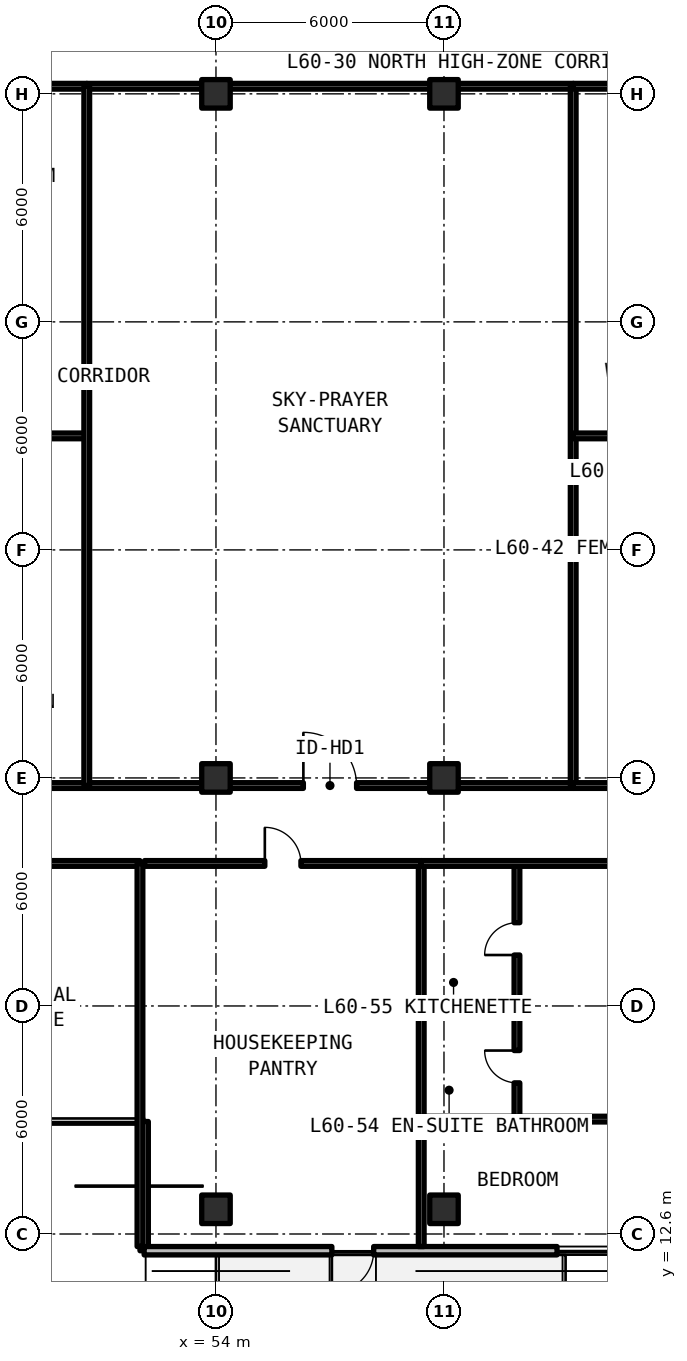
"""IFC4 building model, lengths in metres.
Left out: names, types, materials, properties, quantities, classifications, styles, units other than length and angle.
Written with IfcOpenShell. Run it as: python <this file> out.ifc"""

import sys

from ifc_helpers import new_model, si_unit, direction, frame, frame_2d, origin, origin_2d, place, context, subcontext, project, spatial, rectangle, extrude, element, fill, save


model = new_model("IFC4")
c1 = context("Model", 3, precision=1e-05, world=origin(), true_north=direction((0.0, 1.0)))
c2 = subcontext(c1, "Body", "Model", "MODEL_VIEW")
j1 = project(units=[si_unit("LENGTHUNIT", "METRE"), si_unit("PLANEANGLEUNIT", "RADIAN")], contexts=[c1])
p1 = place(None, origin())
s1 = spatial("IfcSite", under=j1, at=p1, CompositionType="ELEMENT")
p2 = place(p1, origin())
s2 = spatial("IfcBuilding", under=s1, at=p2, CompositionType="ELEMENT")
p3 = place(p2, frame((0.0, 0.0, 215.49)))
s3 = spatial("IfcBuildingStorey", under=s2, at=p3, CompositionType="ELEMENT", Elevation=215.49)
for number, where, z_axis, x_axis in (
    (1, (54.0, 24.6, 0.0), (0.0, 0.0, 1.0), (1.0, 0.0, 0.0)),
    (2, (54.0, 42.6, 0.0), (0.0, 0.0, 1.0), (1.0, 0.0, 0.0)),
    (3, (60.0, 24.6, 0.0), (0.0, 0.0, 1.0), (1.0, 0.0, 0.0)),
    (4, (60.0, 42.6, 0.0), (0.0, 0.0, 1.0), (1.0, 0.0, 0.0)),
    (5, (54.0, 13.25, 0.0), (0.0, 0.0, 1.0), (1.0, 0.0, 0.0)),
    (6, (60.0, 13.25, 0.0), (0.0, 0.0, 1.0), (1.0, 0.0, 0.0)),
):
    element("IfcColumn", number, at=place(p3, frame(where, z_axis=z_axis, x_axis=x_axis)), inside=s3, PredefinedType="COLUMN", context=c2, shape_type="SweptSolid", body=[
        extrude(rectangle(XDim=0.75, YDim=0.75, at=origin_2d()), origin(), (0.0, 0.0, 1.0), 3.63),
    ])
p4 = place(p3, frame((52.11, 15.56, 0.0), z_axis=(0.0, 0.0, 1.0), x_axis=(0.0, -1.0, 0.0)))
e7 = element("IfcWall", 7, at=p4, inside=s3, PredefinedType="SOLIDWALL", context=c2, shape_type="SweptSolid", body=[
    extrude(rectangle(XDim=3.4, YDim=0.22, at=frame_2d((1.7, 0.0))), origin(), (0.0, 0.0, 1.0), 3.41),
])
p5 = place(p3, frame((52.11, 12.16, 0.0), z_axis=(0.0, 0.0, 1.0), x_axis=(1.0, 0.0, 0.0)))
e8 = element("IfcWall", 8, at=p5, inside=s3, PredefinedType="SOLIDWALL", context=c2, shape_type="SweptSolid", body=[
    extrude(rectangle(XDim=43.244, YDim=0.22, at=frame_2d((21.622, 0.0))), origin(), (0.0, 0.0, 1.0), 3.41),
])
p6 = place(p5, frame((4.94, 0.0, 0.0)))
e9 = element("IfcOpeningElement", 9, at=p6, cuts=e8, PredefinedType="OPENING", context=c2, shape_type="SweptSolid", body=[
    extrude(rectangle(XDim=1.1, YDim=2.15, at=frame_2d((0.55, 1.075))), frame((0.0, 0.12, 0.0), z_axis=(0.0, -1.0, 0.0), x_axis=(1.0, 0.0, 0.0)), (0.0, 0.0, 1.0), 0.24),
])
p7 = place(p5, frame((17.04, 0.0, 0.0)))
e10 = element("IfcOpeningElement", 10, at=p7, cuts=e8, PredefinedType="OPENING", context=c2, shape_type="SweptSolid", body=[
    extrude(rectangle(XDim=1.1, YDim=2.15, at=frame_2d((0.55, 1.075))), frame((0.0, 0.12, 0.0), z_axis=(0.0, -1.0, 0.0), x_axis=(1.0, 0.0, 0.0)), (0.0, 0.0, 1.0), 0.24),
])
p8 = place(p5, frame((28.89, 0.0, 0.0)))
e11 = element("IfcOpeningElement", 11, at=p8, cuts=e8, PredefinedType="OPENING", context=c2, shape_type="SweptSolid", body=[
    extrude(rectangle(XDim=1.1, YDim=2.15, at=frame_2d((0.55, 1.075))), frame((0.0, 0.12, 0.0), z_axis=(0.0, -1.0, 0.0), x_axis=(1.0, 0.0, 0.0)), (0.0, 0.0, 1.0), 0.24),
])
p9 = place(p5, frame((10.865, 0.0, 0.78)))
e12 = element("IfcOpeningElement", 12, at=p9, cuts=e8, PredefinedType="OPENING", context=c2, shape_type="SweptSolid", body=[
    extrude(rectangle(XDim=1.65, YDim=1.66, at=frame_2d((0.825, 0.83))), frame((0.0, 0.12, 0.0), z_axis=(0.0, -1.0, 0.0), x_axis=(1.0, 0.0, 0.0)), (0.0, 0.0, 1.0), 0.24),
])
p10 = place(p5, frame((38.666, 0.0, 0.78)))
e13 = element("IfcOpeningElement", 13, at=p10, cuts=e8, PredefinedType="OPENING", context=c2, shape_type="SweptSolid", body=[
    extrude(rectangle(XDim=1.65, YDim=1.66, at=frame_2d((0.825, 0.83))), frame((0.0, 0.12, 0.0), z_axis=(0.0, -1.0, 0.0), x_axis=(1.0, 0.0, 0.0)), (0.0, 0.0, 1.0), 0.24),
])
for number, where, z_axis, x_axis in (
    (14, (46.55, 24.4, 0.0), (0.0, 0.0, 1.0), (1.0, 0.0, 0.0)),
    (15, (46.55, 33.6, 0.0), (0.0, 0.0, 1.0), (1.0, 0.0, 0.0)),
    (16, (46.55, 42.8, 0.0), (0.0, 0.0, 1.0), (1.0, 0.0, 0.0)),
):
    element("IfcWall", number, at=place(p3, frame(where, z_axis=z_axis, x_axis=x_axis)), inside=s3, PredefinedType="SOLIDWALL", context=c2, shape_type="SweptSolid", body=[
        extrude(rectangle(XDim=4.05, YDim=0.15, at=frame_2d((2.025, 0.0))), origin(), (0.0, 0.0, 1.0), 2.63),
    ])
p11 = place(p3, frame((50.6, 24.4, 0.0), z_axis=(0.0, 0.0, 1.0), x_axis=(1.0, 0.0, 0.0)))
e17 = element("IfcWall", 17, at=p11, inside=s3, PredefinedType="SOLIDWALL", context=c2, shape_type="SweptSolid", body=[
    extrude(rectangle(XDim=12.8, YDim=0.15, at=frame_2d((6.4, 0.0))), origin(), (0.0, 0.0, 1.0), 2.63),
])
p12 = place(p11, frame((5.7, 0.0, 0.0)))
e18 = element("IfcOpeningElement", 18, at=p12, cuts=e17, PredefinedType="OPENING", context=c2, shape_type="SweptSolid", body=[
    extrude(rectangle(XDim=1.4, YDim=2.15, at=frame_2d((0.7, 1.075))), frame((0.0, 0.085, 0.0), z_axis=(0.0, -1.0, 0.0), x_axis=(1.0, 0.0, 0.0)), (0.0, 0.0, 1.0), 0.17),
])
p13 = place(p3, frame((50.6, 42.8, 0.0), z_axis=(0.0, 0.0, 1.0), x_axis=(1.0, 0.0, 0.0)))
e19 = element("IfcWall", 19, at=p13, inside=s3, PredefinedType="SOLIDWALL", context=c2, shape_type="SweptSolid", body=[
    extrude(rectangle(XDim=12.8, YDim=0.15, at=frame_2d((6.4, 0.0))), origin(), (0.0, 0.0, 1.0), 2.63),
])
for number, where, z_axis, x_axis in (
    (20, (50.6, 24.4, 0.0), (0.0, 0.0, 1.0), (0.0, 1.0, 0.0)),
    (21, (63.4, 24.4, 0.0), (0.0, 0.0, 1.0), (0.0, 1.0, 0.0)),
):
    element("IfcWall", number, at=place(p3, frame(where, z_axis=z_axis, x_axis=x_axis)), inside=s3, PredefinedType="SOLIDWALL", context=c2, shape_type="SweptSolid", body=[
        extrude(rectangle(XDim=18.4, YDim=0.15, at=frame_2d((9.2, 0.0))), origin(), (0.0, 0.0, 1.0), 2.63),
    ])
for number, where, z_axis, x_axis in (
    (22, (63.4, 24.4, 0.0), (0.0, 0.0, 1.0), (1.0, 0.0, 0.0)),
    (23, (63.4, 33.6, 0.0), (0.0, 0.0, 1.0), (1.0, 0.0, 0.0)),
    (24, (63.4, 42.8, 0.0), (0.0, 0.0, 1.0), (1.0, 0.0, 0.0)),
):
    element("IfcWall", number, at=place(p3, frame(where, z_axis=z_axis, x_axis=x_axis)), inside=s3, PredefinedType="SOLIDWALL", context=c2, shape_type="SweptSolid", body=[
        extrude(rectangle(XDim=4.05, YDim=0.15, at=frame_2d((2.025, 0.0))), origin(), (0.0, 0.0, 1.0), 2.63),
    ])
p14 = place(p3, frame((43.6, 22.35, 0.0), z_axis=(0.0, 0.0, 1.0), x_axis=(1.0, 0.0, 0.0)))
e25 = element("IfcWall", 25, at=p14, inside=s3, PredefinedType="SOLIDWALL", context=c2, shape_type="SweptSolid", body=[
    extrude(rectangle(XDim=8.4, YDim=0.15, at=frame_2d((4.2, 0.0))), origin(), (0.0, 0.0, 1.0), 2.63),
])
p15 = place(p14, frame((3.65, 0.0, 0.0)))
e26 = element("IfcOpeningElement", 26, at=p15, cuts=e25, PredefinedType="OPENING", context=c2, shape_type="SweptSolid", body=[
    extrude(rectangle(XDim=1.1, YDim=2.15, at=frame_2d((0.55, 1.075))), frame((0.0, 0.085, 0.0), z_axis=(0.0, -1.0, 0.0), x_axis=(1.0, 0.0, 0.0)), (0.0, 0.0, 1.0), 0.17),
])
for number, where, z_axis, x_axis in (
    (27, (52.0, 12.27, 0.0), (0.0, 0.0, 1.0), (0.0, 1.0, 0.0)),
    (28, (59.401, 12.27, 0.0), (0.0, 0.0, 1.0), (0.0, 1.0, 0.0)),
):
    element("IfcWall", number, at=place(p3, frame(where, z_axis=z_axis, x_axis=x_axis)), inside=s3, PredefinedType="SOLIDWALL", context=c2, shape_type="SweptSolid", body=[
        extrude(rectangle(XDim=10.08, YDim=0.15, at=frame_2d((5.04, 0.0))), origin(), (0.0, 0.0, 1.0), 2.63),
    ])
p16 = place(p3, frame((52.12, 22.35, 0.0), z_axis=(0.0, 0.0, 1.0), x_axis=(1.0, 0.0, 0.0)))
e29 = element("IfcWall", 29, at=p16, inside=s3, PredefinedType="SOLIDWALL", context=c2, shape_type="SweptSolid", body=[
    extrude(rectangle(XDim=7.281, YDim=0.15, at=frame_2d((3.641, 0.0))), origin(), (0.0, 0.0, 1.0), 2.63),
])
p17 = place(p16, frame((3.166, 0.0, 0.0)))
e30 = element("IfcOpeningElement", 30, at=p17, cuts=e29, PredefinedType="OPENING", context=c2, shape_type="SweptSolid", body=[
    extrude(rectangle(XDim=0.95, YDim=2.15, at=frame_2d((0.475, 1.075))), frame((0.0, 0.085, 0.0), z_axis=(0.0, -1.0, 0.0), x_axis=(1.0, 0.0, 0.0)), (0.0, 0.0, 1.0), 0.17),
])
p18 = place(p3, frame((59.401, 18.381, 0.0), z_axis=(0.0, 0.0, 1.0), x_axis=(1.0, 0.0, 0.0)))
e31 = element("IfcWall", 31, at=p18, inside=s3, PredefinedType="PARTITIONING", context=c2, shape_type="SweptSolid", body=[
    extrude(rectangle(XDim=2.519, YDim=0.15, at=frame_2d((1.259, 0.0))), origin(), (0.0, 0.0, 1.0), 2.63),
])
p19 = place(p3, frame((61.92, 15.623, 0.0), z_axis=(0.0, 0.0, 1.0), x_axis=(0.0, 1.0, 0.0)))
e32 = element("IfcWall", 32, at=p19, inside=s3, PredefinedType="PARTITIONING", context=c2, shape_type="SweptSolid", body=[
    extrude(rectangle(XDim=6.727, YDim=0.15, at=frame_2d((3.364, 0.0))), origin(), (0.0, 0.0, 1.0), 2.63),
])
p20 = place(p19, frame((0.954, 0.0, 0.0)))
e33 = element("IfcOpeningElement", 33, at=p20, cuts=e32, PredefinedType="OPENING", context=c2, shape_type="SweptSolid", body=[
    extrude(rectangle(XDim=0.85, YDim=2.1, at=frame_2d((0.425, 1.05))), frame((0.0, 0.085, 0.0), z_axis=(0.0, -1.0, 0.0), x_axis=(1.0, 0.0, 0.0)), (0.0, 0.0, 1.0), 0.17),
])
p21 = place(p19, frame((4.318, 0.0, 0.0)))
e34 = element("IfcOpeningElement", 34, at=p21, cuts=e32, PredefinedType="OPENING", context=c2, shape_type="SweptSolid", body=[
    extrude(rectangle(XDim=0.85, YDim=2.1, at=frame_2d((0.425, 1.05))), frame((0.0, 0.085, 0.0), z_axis=(0.0, -1.0, 0.0), x_axis=(1.0, 0.0, 0.0)), (0.0, 0.0, 1.0), 0.17),
])
p22 = place(p3, frame((59.401, 15.623, 0.0), z_axis=(0.0, 0.0, 1.0), x_axis=(1.0, 0.0, 0.0)))
e35 = element("IfcWall", 35, at=p22, inside=s3, PredefinedType="PARTITIONING", context=c2, shape_type="SweptSolid", body=[
    extrude(rectangle(XDim=8.798, YDim=0.15, at=frame_2d((4.399, 0.0))), origin(), (0.0, 0.0, 1.0), 2.63),
])
p23 = place(p22, frame((5.273, 0.0, 0.0)))
e36 = element("IfcOpeningElement", 36, at=p23, cuts=e35, PredefinedType="OPENING", context=c2, shape_type="SweptSolid", body=[
    extrude(rectangle(XDim=0.85, YDim=2.1, at=frame_2d((0.425, 1.05))), frame((0.0, 0.085, 0.0), z_axis=(0.0, -1.0, 0.0), x_axis=(1.0, 0.0, 0.0)), (0.0, 0.0, 1.0), 0.17),
])
p24 = place(p3, frame((59.401, 22.35, 0.0), z_axis=(0.0, 0.0, 1.0), x_axis=(1.0, 0.0, 0.0)))
e37 = element("IfcWall", 37, at=p24, inside=s3, PredefinedType="SOLIDWALL", context=c2, shape_type="SweptSolid", body=[
    extrude(rectangle(XDim=8.798, YDim=0.15, at=frame_2d((4.399, 0.0))), origin(), (0.0, 0.0, 1.0), 2.63),
])
p25 = place(p24, frame((5.223, 0.0, 0.0)))
e38 = element("IfcOpeningElement", 38, at=p25, cuts=e37, PredefinedType="OPENING", context=c2, shape_type="SweptSolid", body=[
    extrude(rectangle(XDim=0.95, YDim=2.15, at=frame_2d((0.475, 1.075))), frame((0.0, 0.085, 0.0), z_axis=(0.0, -1.0, 0.0), x_axis=(1.0, 0.0, 0.0)), (0.0, 0.0, 1.0), 0.17),
])
p26 = place(p6, frame((1.1, 0.0, 0.0), z_axis=(0.0, 0.0, 1.0), x_axis=(-1.0, 0.0, 0.0)))
e39 = element("IfcDoor", 39, at=p26, inside=s3, OperationType="SINGLE_SWING_RIGHT", PredefinedType="DOOR", context=c2, shape_type="SweptSolid", body=[
    extrude(rectangle(XDim=1.1, YDim=2.15, at=frame_2d((0.55, 1.075))), frame((0.0, 0.025, 0.0), z_axis=(0.0, -1.0, 0.0), x_axis=(1.0, 0.0, 0.0)), (0.0, 0.0, 1.0), 0.05),
])
fill(e9, e39)
p27 = place(p9, origin())
e40 = element("IfcWindow", 40, at=p27, inside=s3, PartitioningType="SINGLE_PANEL", PredefinedType="WINDOW", context=c2, shape_type="SweptSolid", body=[
    extrude(rectangle(XDim=1.65, YDim=1.66, at=frame_2d((0.825, 0.83))), frame((0.0, 0.03, 0.0), z_axis=(0.0, -1.0, 0.0), x_axis=(1.0, 0.0, 0.0)), (0.0, 0.0, 1.0), 0.06),
])
fill(e12, e40)
p28 = place(p12, origin())
e41 = element("IfcDoor", 41, at=p28, inside=s3, OperationType="SINGLE_SWING_RIGHT", PredefinedType="DOOR", context=c2, shape_type="SweptSolid", body=[
    extrude(rectangle(XDim=1.4, YDim=2.15, at=frame_2d((0.7, 1.075))), frame((0.0, 0.025, 0.0), z_axis=(0.0, -1.0, 0.0), x_axis=(1.0, 0.0, 0.0)), (0.0, 0.0, 1.0), 0.05),
])
fill(e18, e41)
p29 = place(p17, origin())
e42 = element("IfcDoor", 42, at=p29, inside=s3, OperationType="SINGLE_SWING_LEFT", PredefinedType="DOOR", context=c2, shape_type="SweptSolid", body=[
    extrude(rectangle(XDim=0.95, YDim=2.15, at=frame_2d((0.475, 1.075))), frame((0.0, 0.025, 0.0), z_axis=(0.0, -1.0, 0.0), x_axis=(1.0, 0.0, 0.0)), (0.0, 0.0, 1.0), 0.05),
])
fill(e30, e42)
p30 = place(p20, origin())
e43 = element("IfcDoor", 43, at=p30, inside=s3, OperationType="SINGLE_SWING_RIGHT", PredefinedType="DOOR", context=c2, shape_type="SweptSolid", body=[
    extrude(rectangle(XDim=0.85, YDim=2.1, at=frame_2d((0.425, 1.05))), frame((0.0, 0.025, 0.0), z_axis=(0.0, -1.0, 0.0), x_axis=(1.0, 0.0, 0.0)), (0.0, 0.0, 1.0), 0.05),
])
fill(e33, e43)
p31 = place(p21, origin())
e44 = element("IfcDoor", 44, at=p31, inside=s3, OperationType="SINGLE_SWING_LEFT", PredefinedType="DOOR", context=c2, shape_type="SweptSolid", body=[
    extrude(rectangle(XDim=0.85, YDim=2.1, at=frame_2d((0.425, 1.05))), frame((0.0, 0.025, 0.0), z_axis=(0.0, -1.0, 0.0), x_axis=(1.0, 0.0, 0.0)), (0.0, 0.0, 1.0), 0.05),
])
fill(e34, e44)
save(model, sys.argv[1])
